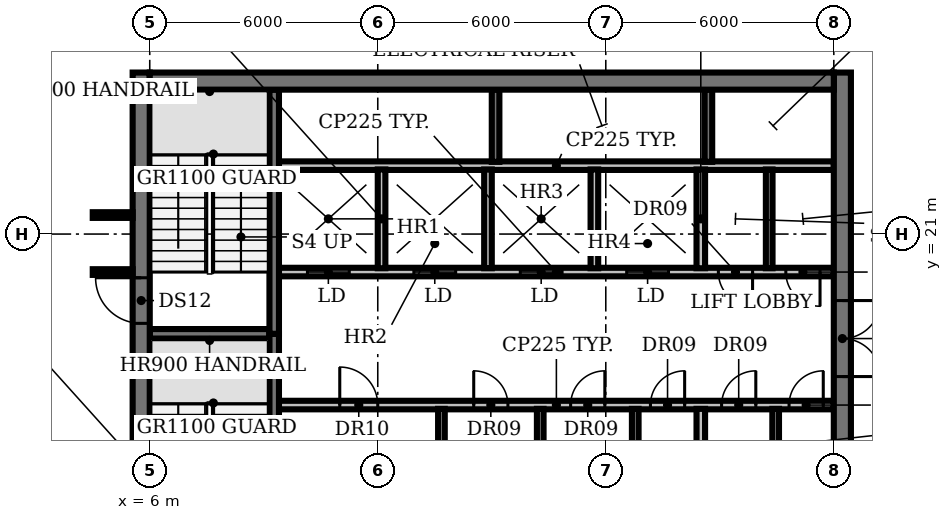
"""IFC4 building model, lengths in metres.
Left out: names, types, materials, properties, quantities, classifications, styles, units other than length and angle.
Written with IfcOpenShell. Run it as: python <this file> out.ifc"""

import sys

from ifc_helpers import new_model, si_unit, direction, frame, frame_2d, origin, place, context, subcontext, project, spatial, rectangle, extrude, element, fill, save


model = new_model("IFC4")
c1 = context("Model", 3, precision=1e-05, world=origin(), true_north=direction((0.0, 1.0)))
c2 = subcontext(c1, "Body", "Model", "MODEL_VIEW")
j1 = project(units=[si_unit("LENGTHUNIT", "METRE"), si_unit("PLANEANGLEUNIT", "RADIAN")], contexts=[c1])
p1 = place(None, origin())
s1 = spatial("IfcSite", under=j1, at=p1, CompositionType="ELEMENT")
p2 = place(p1, origin())
s2 = spatial("IfcBuilding", under=s1, at=p2, CompositionType="ELEMENT")
p3 = place(p2, frame((0.0, 0.0, 239.0)))
s3 = spatial("IfcBuildingStorey", under=s2, at=p3, CompositionType="ELEMENT", Elevation=239.0)
p4 = place(p3, frame((9.4, 16.5, 0.0), z_axis=(0.0, 0.0, 1.0), x_axis=(1.0, 0.0, 0.0)))
e1 = element("IfcWall", 1, at=p4, inside=s3, PredefinedType="PARTITIONING", context=c2, shape_type="SweptSolid", body=[
    extrude(rectangle(XDim=14.6, YDim=0.225, at=frame_2d((7.3, 0.0))), origin(), (0.0, 0.0, 1.0), 3.85),
])
p5 = place(p4, frame((1.6, 0.0, 0.0)))
e2 = element("IfcOpeningElement", 2, at=p5, cuts=e1, PredefinedType="OPENING", context=c2, shape_type="SweptSolid", body=[
    extrude(rectangle(XDim=1.0, YDim=2.1, at=frame_2d((0.5, 1.05))), frame((0.0, 0.123, 0.0), z_axis=(0.0, -1.0, 0.0), x_axis=(1.0, 0.0, 0.0)), (0.0, 0.0, 1.0), 0.245),
])
p6 = place(p4, frame((5.125, 0.0, 0.0)))
e3 = element("IfcOpeningElement", 3, at=p6, cuts=e1, PredefinedType="OPENING", context=c2, shape_type="SweptSolid", body=[
    extrude(rectangle(XDim=0.9, YDim=2.1, at=frame_2d((0.45, 1.05))), frame((0.0, 0.123, 0.0), z_axis=(0.0, -1.0, 0.0), x_axis=(1.0, 0.0, 0.0)), (0.0, 0.0, 1.0), 0.245),
])
p7 = place(p4, frame((7.675, 0.0, 0.0)))
e4 = element("IfcOpeningElement", 4, at=p7, cuts=e1, PredefinedType="OPENING", context=c2, shape_type="SweptSolid", body=[
    extrude(rectangle(XDim=0.9, YDim=2.1, at=frame_2d((0.45, 1.05))), frame((0.0, 0.123, 0.0), z_axis=(0.0, -1.0, 0.0), x_axis=(1.0, 0.0, 0.0)), (0.0, 0.0, 1.0), 0.245),
])
p8 = place(p4, frame((9.775, 0.0, 0.0)))
e5 = element("IfcOpeningElement", 5, at=p8, cuts=e1, PredefinedType="OPENING", context=c2, shape_type="SweptSolid", body=[
    extrude(rectangle(XDim=0.9, YDim=2.1, at=frame_2d((0.45, 1.05))), frame((0.0, 0.123, 0.0), z_axis=(0.0, -1.0, 0.0), x_axis=(1.0, 0.0, 0.0)), (0.0, 0.0, 1.0), 0.245),
])
p9 = place(p4, frame((11.647, 0.0, 0.0)))
e6 = element("IfcOpeningElement", 6, at=p9, cuts=e1, PredefinedType="OPENING", context=c2, shape_type="SweptSolid", body=[
    extrude(rectangle(XDim=0.9, YDim=2.1, at=frame_2d((0.45, 1.05))), frame((0.0, 0.123, 0.0), z_axis=(0.0, -1.0, 0.0), x_axis=(1.0, 0.0, 0.0)), (0.0, 0.0, 1.0), 0.245),
])
p10 = place(p4, frame((13.423, 0.0, 0.0)))
e7 = element("IfcOpeningElement", 7, at=p10, cuts=e1, PredefinedType="OPENING", context=c2, shape_type="SweptSolid", body=[
    extrude(rectangle(XDim=0.9, YDim=2.1, at=frame_2d((0.45, 1.05))), frame((0.0, 0.123, 0.0), z_axis=(0.0, -1.0, 0.0), x_axis=(1.0, 0.0, 0.0)), (0.0, 0.0, 1.0), 0.245),
])
p11 = place(p3, frame((6.0, 18.375, 0.0), z_axis=(0.0, 0.0, 1.0), x_axis=(1.0, 0.0, 0.0)))
e8 = element("IfcWall", 8, at=p11, inside=s3, PredefinedType="SHEAR", context=c2, shape_type="SweptSolid", body=[
    extrude(rectangle(XDim=3.15, YDim=0.25, at=frame_2d((1.575, 0.0))), origin(), (0.0, 0.0, 1.0), 3.85),
])
p12 = place(p3, frame((24.0, 20.0, 0.0), z_axis=(0.0, 0.0, 1.0), x_axis=(-1.0, 0.0, 0.0)))
e9 = element("IfcWall", 9, at=p12, inside=s3, PredefinedType="PARTITIONING", context=c2, shape_type="SweptSolid", body=[
    extrude(rectangle(XDim=14.6, YDim=0.225, at=frame_2d((7.3, 0.0))), origin(), (0.0, 0.0, 1.0), 3.85),
])
p13 = place(p12, frame((12.75, 0.0, 0.0)))
e10 = element("IfcOpeningElement", 10, at=p13, cuts=e9, PredefinedType="OPENING", context=c2, shape_type="SweptSolid", body=[
    extrude(rectangle(XDim=1.1, YDim=2.1, at=frame_2d((0.55, 1.05))), frame((0.0, 0.123, 0.0), z_axis=(0.0, -1.0, 0.0), x_axis=(1.0, 0.0, 0.0)), (0.0, 0.0, 1.0), 0.245),
])
p14 = place(p12, frame((9.95, 0.0, 0.0)))
e11 = element("IfcOpeningElement", 11, at=p14, cuts=e9, PredefinedType="OPENING", context=c2, shape_type="SweptSolid", body=[
    extrude(rectangle(XDim=1.1, YDim=2.1, at=frame_2d((0.55, 1.05))), frame((0.0, 0.123, 0.0), z_axis=(0.0, -1.0, 0.0), x_axis=(1.0, 0.0, 0.0)), (0.0, 0.0, 1.0), 0.245),
])
p15 = place(p12, frame((7.15, 0.0, 0.0)))
e12 = element("IfcOpeningElement", 12, at=p15, cuts=e9, PredefinedType="OPENING", context=c2, shape_type="SweptSolid", body=[
    extrude(rectangle(XDim=1.1, YDim=2.1, at=frame_2d((0.55, 1.05))), frame((0.0, 0.123, 0.0), z_axis=(0.0, -1.0, 0.0), x_axis=(1.0, 0.0, 0.0)), (0.0, 0.0, 1.0), 0.245),
])
p16 = place(p12, frame((4.35, 0.0, 0.0)))
e13 = element("IfcOpeningElement", 13, at=p16, cuts=e9, PredefinedType="OPENING", context=c2, shape_type="SweptSolid", body=[
    extrude(rectangle(XDim=1.1, YDim=2.1, at=frame_2d((0.55, 1.05))), frame((0.0, 0.123, 0.0), z_axis=(0.0, -1.0, 0.0), x_axis=(1.0, 0.0, 0.0)), (0.0, 0.0, 1.0), 0.245),
])
p17 = place(p12, frame((2.137, 0.0, 0.0)))
e14 = element("IfcOpeningElement", 14, at=p17, cuts=e9, PredefinedType="OPENING", context=c2, shape_type="SweptSolid", body=[
    extrude(rectangle(XDim=0.9, YDim=2.1, at=frame_2d((0.45, 1.05))), frame((0.0, 0.123, 0.0), z_axis=(0.0, -1.0, 0.0), x_axis=(1.0, 0.0, 0.0)), (0.0, 0.0, 1.0), 0.245),
])
p18 = place(p12, frame((0.363, 0.0, 0.0)))
e15 = element("IfcOpeningElement", 15, at=p18, cuts=e9, PredefinedType="OPENING", context=c2, shape_type="SweptSolid", body=[
    extrude(rectangle(XDim=0.9, YDim=2.1, at=frame_2d((0.45, 1.05))), frame((0.0, 0.123, 0.0), z_axis=(0.0, -1.0, 0.0), x_axis=(1.0, 0.0, 0.0)), (0.0, 0.0, 1.0), 0.245),
])
p19 = place(p3, frame((9.4, 22.8, 0.0), z_axis=(0.0, 0.0, 1.0), x_axis=(1.0, 0.0, 0.0)))
e16 = element("IfcWall", 16, at=p19, inside=s3, PredefinedType="PARTITIONING", context=c2, shape_type="SweptSolid", body=[
    extrude(rectangle(XDim=14.6, YDim=0.225, at=frame_2d((7.3, 0.0))), origin(), (0.0, 0.0, 1.0), 3.85),
])
p20 = place(p3, frame((9.275, 18.375, 0.0), z_axis=(0.0, 0.0, 1.0), x_axis=(0.0, -1.0, 0.0)))
e17 = element("IfcWall", 17, at=p20, inside=s3, PredefinedType="SHEAR", context=c2, shape_type="SweptSolid", body=[
    extrude(rectangle(XDim=6.55, YDim=0.25, at=frame_2d((3.275, 0.0))), origin(), (0.0, 0.0, 1.0), 3.85),
])
p21 = place(p20, frame((5.075, 0.0, 0.0)))
e18 = element("IfcOpeningElement", 18, at=p21, cuts=e17, PredefinedType="OPENING", context=c2, shape_type="SweptSolid", body=[
    extrude(rectangle(XDim=1.0, YDim=2.1, at=frame_2d((0.5, 1.05))), frame((0.0, 0.135, 0.0), z_axis=(0.0, -1.0, 0.0), x_axis=(1.0, 0.0, 0.0)), (0.0, 0.0, 1.0), 0.27),
])
p22 = place(p3, frame((9.275, 18.375, 0.0), z_axis=(0.0, 0.0, 1.0), x_axis=(0.0, 1.0, 0.0)))
e19 = element("IfcWall", 19, at=p22, inside=s3, PredefinedType="SHEAR", context=c2, shape_type="SweptSolid", body=[
    extrude(rectangle(XDim=6.425, YDim=0.25, at=frame_2d((3.212, 0.0))), origin(), (0.0, 0.0, 1.0), 3.85),
])
p23 = place(p3, frame((12.1, 20.1, 0.0), z_axis=(0.0, 0.0, 1.0), x_axis=(0.0, 1.0, 0.0)))
e20 = element("IfcWall", 20, at=p23, inside=s3, PredefinedType="SOLIDWALL", context=c2, shape_type="SweptSolid", body=[
    extrude(rectangle(XDim=2.6, YDim=0.2, at=frame_2d((1.3, 0.0))), origin(), (0.0, 0.0, 1.0), 3.85),
])
p24 = place(p3, frame((13.675, 13.8, 0.0), z_axis=(0.0, 0.0, 1.0), x_axis=(0.0, 1.0, 0.0)))
e21 = element("IfcWall", 21, at=p24, inside=s3, PredefinedType="PARTITIONING", context=c2, shape_type="SweptSolid", body=[
    extrude(rectangle(XDim=2.6, YDim=0.175, at=frame_2d((1.3, 0.0))), origin(), (0.0, 0.0, 1.0), 3.85),
])
p25 = place(p3, frame((14.9, 20.1, 0.0), z_axis=(0.0, 0.0, 1.0), x_axis=(0.0, 1.0, 0.0)))
e22 = element("IfcWall", 22, at=p25, inside=s3, PredefinedType="SOLIDWALL", context=c2, shape_type="SweptSolid", body=[
    extrude(rectangle(XDim=2.6, YDim=0.2, at=frame_2d((1.3, 0.0))), origin(), (0.0, 0.0, 1.0), 3.85),
])
p26 = place(p3, frame((15.1, 22.9, 0.0), z_axis=(0.0, 0.0, 1.0), x_axis=(0.0, 1.0, 0.0)))
e23 = element("IfcWall", 23, at=p26, inside=s3, PredefinedType="SHEAR", context=c2, shape_type="SweptSolid", body=[
    extrude(rectangle(XDim=1.9, YDim=0.2, at=frame_2d((0.95, 0.0))), origin(), (0.0, 0.0, 1.0), 3.85),
])
p27 = place(p3, frame((16.275, 13.8, 0.0), z_axis=(0.0, 0.0, 1.0), x_axis=(0.0, 1.0, 0.0)))
e24 = element("IfcWall", 24, at=p27, inside=s3, PredefinedType="PARTITIONING", context=c2, shape_type="SweptSolid", body=[
    extrude(rectangle(XDim=2.6, YDim=0.175, at=frame_2d((1.3, 0.0))), origin(), (0.0, 0.0, 1.0), 3.85),
])
p28 = place(p3, frame((17.7, 20.1, 0.0), z_axis=(0.0, 0.0, 1.0), x_axis=(0.0, 1.0, 0.0)))
e25 = element("IfcWall", 25, at=p28, inside=s3, PredefinedType="SOLIDWALL", context=c2, shape_type="SweptSolid", body=[
    extrude(rectangle(XDim=2.6, YDim=0.2, at=frame_2d((1.3, 0.0))), origin(), (0.0, 0.0, 1.0), 3.85),
])
p29 = place(p3, frame((18.775, 13.8, 0.0), z_axis=(0.0, 0.0, 1.0), x_axis=(0.0, 1.0, 0.0)))
e26 = element("IfcWall", 26, at=p29, inside=s3, PredefinedType="PARTITIONING", context=c2, shape_type="SweptSolid", body=[
    extrude(rectangle(XDim=2.6, YDim=0.175, at=frame_2d((1.3, 0.0))), origin(), (0.0, 0.0, 1.0), 3.85),
])
for number, where, z_axis, x_axis in (
    (27, (20.5, 13.8, 0.0), (0.0, 0.0, 1.0), (0.0, 1.0, 0.0)),
    (28, (20.5, 20.1, 0.0), (0.0, 0.0, 1.0), (0.0, 1.0, 0.0)),
):
    element("IfcWall", number, at=place(p3, frame(where, z_axis=z_axis, x_axis=x_axis)), inside=s3, PredefinedType="PARTITIONING", context=c2, shape_type="SweptSolid", body=[
        extrude(rectangle(XDim=2.6, YDim=0.225, at=frame_2d((1.3, 0.0))), origin(), (0.0, 0.0, 1.0), 3.85),
    ])
p30 = place(p3, frame((20.7, 22.9, 0.0), z_axis=(0.0, 0.0, 1.0), x_axis=(0.0, 1.0, 0.0)))
e29 = element("IfcWall", 29, at=p30, inside=s3, PredefinedType="SHEAR", context=c2, shape_type="SweptSolid", body=[
    extrude(rectangle(XDim=1.9, YDim=0.2, at=frame_2d((0.95, 0.0))), origin(), (0.0, 0.0, 1.0), 3.85),
])
for number, where, z_axis, x_axis in (
    (30, (22.3, 20.1, 0.0), (0.0, 0.0, 1.0), (0.0, 1.0, 0.0)),
    (31, (22.47, 13.8, 0.0), (0.0, 0.0, 1.0), (0.0, 1.0, 0.0)),
):
    element("IfcWall", number, at=place(p3, frame(where, z_axis=z_axis, x_axis=x_axis)), inside=s3, PredefinedType="PARTITIONING", context=c2, shape_type="SweptSolid", body=[
        extrude(rectangle(XDim=2.6, YDim=0.175, at=frame_2d((1.3, 0.0))), origin(), (0.0, 0.0, 1.0), 3.85),
    ])
p31 = place(p3, frame((5.775, 4.42, 0.0), z_axis=(0.0, 0.0, 1.0), x_axis=(0.0, 1.0, 0.0)))
e32 = element("IfcWall", 32, at=p31, inside=s3, PredefinedType="SHEAR", context=c2, shape_type="SweptSolid", body=[
    extrude(rectangle(XDim=20.83, YDim=0.45, at=frame_2d((10.415, 0.0))), origin(), (0.0, 0.0, 1.0), 3.85),
])
p32 = place(p31, frame((1.23, 0.0, 0.0)))
e33 = element("IfcOpeningElement", 33, at=p32, cuts=e32, PredefinedType="OPENING", context=c2, shape_type="SweptSolid", body=[
    extrude(rectangle(XDim=1.5, YDim=2.1, at=frame_2d((0.75, 1.05))), frame((0.0, 0.235, 0.0), z_axis=(0.0, -1.0, 0.0), x_axis=(1.0, 0.0, 0.0)), (0.0, 0.0, 1.0), 0.47),
])
p33 = place(p31, frame((7.68, 0.0, 0.0)))
e34 = element("IfcOpeningElement", 34, at=p33, cuts=e32, PredefinedType="OPENING", context=c2, shape_type="SweptSolid", body=[
    extrude(rectangle(XDim=1.2, YDim=2.1, at=frame_2d((0.6, 1.05))), frame((0.0, 0.235, 0.0), z_axis=(0.0, -1.0, 0.0), x_axis=(1.0, 0.0, 0.0)), (0.0, 0.0, 1.0), 0.47),
])
p34 = place(p31, frame((14.23, 0.0, 0.0)))
e35 = element("IfcOpeningElement", 35, at=p34, cuts=e32, PredefinedType="OPENING", context=c2, shape_type="SweptSolid", body=[
    extrude(rectangle(XDim=1.2, YDim=2.1, at=frame_2d((0.6, 1.05))), frame((0.0, 0.235, 0.0), z_axis=(0.0, -1.0, 0.0), x_axis=(1.0, 0.0, 0.0)), (0.0, 0.0, 1.0), 0.47),
])
p35 = place(p3, frame((24.225, 25.25, 0.0), z_axis=(0.0, 0.0, 1.0), x_axis=(0.0, -1.0, 0.0)))
e36 = element("IfcWall", 36, at=p35, inside=s3, PredefinedType="SHEAR", context=c2, shape_type="SweptSolid", body=[
    extrude(rectangle(XDim=20.83, YDim=0.45, at=frame_2d((10.415, 0.0))), origin(), (0.0, 0.0, 1.0), 3.85),
])
p36 = place(p35, frame((18.1, 0.0, 0.0)))
e37 = element("IfcOpeningElement", 37, at=p36, cuts=e36, PredefinedType="OPENING", context=c2, shape_type="SweptSolid", body=[
    extrude(rectangle(XDim=1.5, YDim=2.1, at=frame_2d((0.75, 1.05))), frame((0.0, 0.235, 0.0), z_axis=(0.0, -1.0, 0.0), x_axis=(1.0, 0.0, 0.0)), (0.0, 0.0, 1.0), 0.47),
])
p37 = place(p35, frame((12.0, 0.0, 0.0)))
e38 = element("IfcOpeningElement", 38, at=p37, cuts=e36, PredefinedType="OPENING", context=c2, shape_type="SweptSolid", body=[
    extrude(rectangle(XDim=0.9, YDim=2.1, at=frame_2d((0.45, 1.05))), frame((0.0, 0.235, 0.0), z_axis=(0.0, -1.0, 0.0), x_axis=(1.0, 0.0, 0.0)), (0.0, 0.0, 1.0), 0.47),
])
p38 = place(p35, frame((6.0, 0.0, 0.0)))
e39 = element("IfcOpeningElement", 39, at=p38, cuts=e36, PredefinedType="OPENING", context=c2, shape_type="SweptSolid", body=[
    extrude(rectangle(XDim=2.0, YDim=2.1, at=frame_2d((1.0, 1.05))), frame((0.0, 0.235, 0.0), z_axis=(0.0, -1.0, 0.0), x_axis=(1.0, 0.0, 0.0)), (0.0, 0.0, 1.0), 0.47),
])
p39 = place(p3, frame((6.0, 25.025, 0.0), z_axis=(0.0, 0.0, 1.0), x_axis=(1.0, 0.0, 0.0)))
e40 = element("IfcWall", 40, at=p39, inside=s3, PredefinedType="SHEAR", context=c2, shape_type="SweptSolid", body=[
    extrude(rectangle(XDim=18.0, YDim=0.45, at=frame_2d((9.0, 0.0))), origin(), (0.0, 0.0, 1.0), 3.85),
])
for number, where, z_axis, x_axis in (
    (41, (4.5, 20.0, 0.0), (0.0, 0.0, 1.0), (1.0, 0.0, 0.0)),
    (42, (4.5, 21.5, 0.0), (0.0, 0.0, 1.0), (1.0, 0.0, 0.0)),
):
    element("IfcWall", number, at=place(p3, frame(where, z_axis=z_axis, x_axis=x_axis)), inside=s3, PredefinedType="PARTITIONING", context=c2, shape_type="SweptSolid", body=[
        extrude(rectangle(XDim=1.05, YDim=0.15, at=frame_2d((0.525, 0.0))), origin(), (0.0, 0.0, 1.0), 2.88),
    ])
p40 = place(p5, origin())
e43 = element("IfcDoor", 43, at=p40, inside=s3, OperationType="SINGLE_SWING_LEFT", PredefinedType="DOOR", context=c2, shape_type="SweptSolid", body=[
    extrude(rectangle(XDim=1.0, YDim=2.1, at=frame_2d((0.5, 1.05))), frame((0.0, 0.025, 0.0), z_axis=(0.0, -1.0, 0.0), x_axis=(1.0, 0.0, 0.0)), (0.0, 0.0, 1.0), 0.05),
])
fill(e2, e43)
p41 = place(p6, origin())
e44 = element("IfcDoor", 44, at=p41, inside=s3, OperationType="SINGLE_SWING_LEFT", PredefinedType="DOOR", context=c2, shape_type="SweptSolid", body=[
    extrude(rectangle(XDim=0.9, YDim=2.1, at=frame_2d((0.45, 1.05))), frame((0.0, 0.025, 0.0), z_axis=(0.0, -1.0, 0.0), x_axis=(1.0, 0.0, 0.0)), (0.0, 0.0, 1.0), 0.05),
])
fill(e3, e44)
p42 = place(p7, origin())
e45 = element("IfcDoor", 45, at=p42, inside=s3, OperationType="SINGLE_SWING_RIGHT", PredefinedType="DOOR", context=c2, shape_type="SweptSolid", body=[
    extrude(rectangle(XDim=0.9, YDim=2.1, at=frame_2d((0.45, 1.05))), frame((0.0, 0.025, 0.0), z_axis=(0.0, -1.0, 0.0), x_axis=(1.0, 0.0, 0.0)), (0.0, 0.0, 1.0), 0.05),
])
fill(e4, e45)
p43 = place(p8, origin())
e46 = element("IfcDoor", 46, at=p43, inside=s3, OperationType="SINGLE_SWING_RIGHT", PredefinedType="DOOR", context=c2, shape_type="SweptSolid", body=[
    extrude(rectangle(XDim=0.9, YDim=2.1, at=frame_2d((0.45, 1.05))), frame((0.0, 0.025, 0.0), z_axis=(0.0, -1.0, 0.0), x_axis=(1.0, 0.0, 0.0)), (0.0, 0.0, 1.0), 0.05),
])
fill(e5, e46)
p44 = place(p9, origin())
e47 = element("IfcDoor", 47, at=p44, inside=s3, OperationType="SINGLE_SWING_RIGHT", PredefinedType="DOOR", context=c2, shape_type="SweptSolid", body=[
    extrude(rectangle(XDim=0.9, YDim=2.1, at=frame_2d((0.45, 1.05))), frame((0.0, 0.025, 0.0), z_axis=(0.0, -1.0, 0.0), x_axis=(1.0, 0.0, 0.0)), (0.0, 0.0, 1.0), 0.05),
])
fill(e6, e47)
p45 = place(p10, origin())
e48 = element("IfcDoor", 48, at=p45, inside=s3, OperationType="SINGLE_SWING_RIGHT", PredefinedType="DOOR", context=c2, shape_type="SweptSolid", body=[
    extrude(rectangle(XDim=0.9, YDim=2.1, at=frame_2d((0.45, 1.05))), frame((0.0, 0.025, 0.0), z_axis=(0.0, -1.0, 0.0), x_axis=(1.0, 0.0, 0.0)), (0.0, 0.0, 1.0), 0.05),
])
fill(e7, e48)
p46 = place(p13, origin())
e49 = element("IfcDoor", 49, at=p46, inside=s3, OperationType="DOUBLE_DOOR_SLIDING", PredefinedType="DOOR", context=c2, shape_type="SweptSolid", body=[
    extrude(rectangle(XDim=1.1, YDim=2.1, at=frame_2d((0.55, 1.05))), frame((0.0, 0.025, 0.0), z_axis=(0.0, -1.0, 0.0), x_axis=(1.0, 0.0, 0.0)), (0.0, 0.0, 1.0), 0.05),
])
fill(e10, e49)
p47 = place(p14, origin())
e50 = element("IfcDoor", 50, at=p47, inside=s3, OperationType="DOUBLE_DOOR_SLIDING", PredefinedType="DOOR", context=c2, shape_type="SweptSolid", body=[
    extrude(rectangle(XDim=1.1, YDim=2.1, at=frame_2d((0.55, 1.05))), frame((0.0, 0.025, 0.0), z_axis=(0.0, -1.0, 0.0), x_axis=(1.0, 0.0, 0.0)), (0.0, 0.0, 1.0), 0.05),
])
fill(e11, e50)
p48 = place(p15, origin())
e51 = element("IfcDoor", 51, at=p48, inside=s3, OperationType="DOUBLE_DOOR_SLIDING", PredefinedType="DOOR", context=c2, shape_type="SweptSolid", body=[
    extrude(rectangle(XDim=1.1, YDim=2.1, at=frame_2d((0.55, 1.05))), frame((0.0, 0.025, 0.0), z_axis=(0.0, -1.0, 0.0), x_axis=(1.0, 0.0, 0.0)), (0.0, 0.0, 1.0), 0.05),
])
fill(e12, e51)
p49 = place(p16, origin())
e52 = element("IfcDoor", 52, at=p49, inside=s3, OperationType="DOUBLE_DOOR_SLIDING", PredefinedType="DOOR", context=c2, shape_type="SweptSolid", body=[
    extrude(rectangle(XDim=1.1, YDim=2.1, at=frame_2d((0.55, 1.05))), frame((0.0, 0.025, 0.0), z_axis=(0.0, -1.0, 0.0), x_axis=(1.0, 0.0, 0.0)), (0.0, 0.0, 1.0), 0.05),
])
fill(e13, e52)
p50 = place(p17, origin())
e53 = element("IfcDoor", 53, at=p50, inside=s3, OperationType="SINGLE_SWING_LEFT", PredefinedType="DOOR", context=c2, shape_type="SweptSolid", body=[
    extrude(rectangle(XDim=0.9, YDim=2.1, at=frame_2d((0.45, 1.05))), frame((0.0, 0.025, 0.0), z_axis=(0.0, -1.0, 0.0), x_axis=(1.0, 0.0, 0.0)), (0.0, 0.0, 1.0), 0.05),
])
fill(e14, e53)
p51 = place(p18, origin())
e54 = element("IfcDoor", 54, at=p51, inside=s3, OperationType="SINGLE_SWING_LEFT", PredefinedType="DOOR", context=c2, shape_type="SweptSolid", body=[
    extrude(rectangle(XDim=0.9, YDim=2.1, at=frame_2d((0.45, 1.05))), frame((0.0, 0.025, 0.0), z_axis=(0.0, -1.0, 0.0), x_axis=(1.0, 0.0, 0.0)), (0.0, 0.0, 1.0), 0.05),
])
fill(e15, e54)
p52 = place(p34, origin())
e55 = element("IfcDoor", 55, at=p52, inside=s3, OperationType="SINGLE_SWING_RIGHT", PredefinedType="DOOR", context=c2, shape_type="SweptSolid", body=[
    extrude(rectangle(XDim=1.2, YDim=2.1, at=frame_2d((0.6, 1.05))), frame((0.0, 0.025, 0.0), z_axis=(0.0, -1.0, 0.0), x_axis=(1.0, 0.0, 0.0)), (0.0, 0.0, 1.0), 0.05),
])
fill(e35, e55)
p53 = place(p38, origin())
e56 = element("IfcDoor", 56, at=p53, inside=s3, OperationType="DOUBLE_DOOR_SINGLE_SWING", PredefinedType="DOOR", context=c2, shape_type="SweptSolid", body=[
    extrude(rectangle(XDim=2.0, YDim=2.1, at=frame_2d((1.0, 1.05))), frame((0.0, 0.025, 0.0), z_axis=(0.0, -1.0, 0.0), x_axis=(1.0, 0.0, 0.0)), (0.0, 0.0, 1.0), 0.05),
])
fill(e39, e56)
save(model, sys.argv[1])
